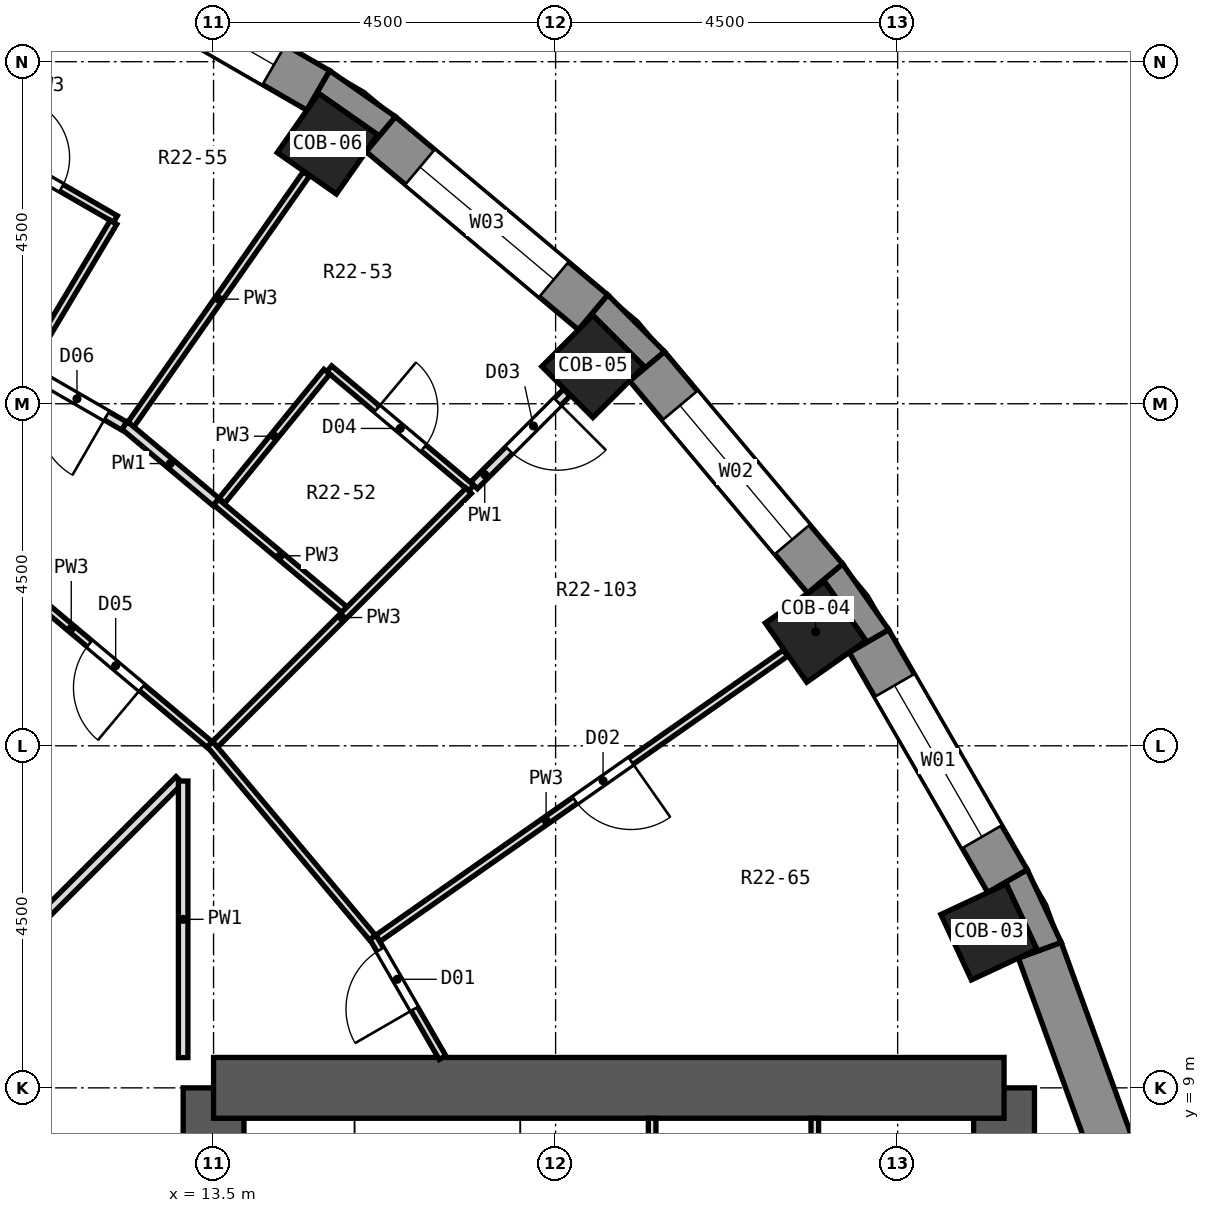
"""IFC4 building model, lengths in metres.
Left out: names, types, materials, properties, quantities, classifications, styles, units other than length and angle.
Written with IfcOpenShell. Run it as: python <this file> out.ifc"""

import sys

from ifc_helpers import new_model, si_unit, direction, frame, frame_2d, origin, origin_2d, place, context, subcontext, project, spatial, polyline, rectangle, outline, extrude, element, fill, save


model = new_model("IFC4")
c1 = context("Model", 3, precision=1e-05, world=origin(), true_north=direction((0.0, 1.0)))
c2 = subcontext(c1, "Body", "Model", "MODEL_VIEW")
j1 = project(units=[si_unit("LENGTHUNIT", "METRE"), si_unit("PLANEANGLEUNIT", "RADIAN")], contexts=[c1])
p1 = place(None, origin())
s1 = spatial("IfcSite", under=j1, at=p1, CompositionType="ELEMENT")
p2 = place(p1, origin())
s2 = spatial("IfcBuilding", under=s1, at=p2, CompositionType="ELEMENT")
p3 = place(p2, frame((0.0, 0.0, 141.4)))
s3 = spatial("IfcBuildingStorey", under=s2, at=p3, CompositionType="ELEMENT", Elevation=141.4)
for number, where, z_axis, x_axis in (
    (1, (23.7, 11.052, 0.0), (0.0, 0.0, 1.0), (0.906, 0.423, 0.0)),
    (2, (21.421, 14.999, 0.0), (0.0, 0.0, 1.0), (0.819, 0.574, 0.0)),
    (3, (18.491, 18.491, 0.0), (0.0, 0.0, 1.0), (0.707, 0.707, 0.0)),
    (4, (14.999, 21.421, 0.0), (0.0, 0.0, 1.0), (0.574, 0.819, 0.0)),
):
    element("IfcColumn", number, at=place(p3, frame(where, z_axis=z_axis, x_axis=x_axis)), inside=s3, PredefinedType="COLUMN", context=c2, shape_type="SweptSolid", body=[
        extrude(rectangle(XDim=0.95, YDim=0.95, at=origin_2d()), origin(), (0.0, 0.0, 1.0), 3.3),
    ])
p4 = place(p3, frame((13.5, -9.0, 0.0), z_axis=(0.0, 0.0, 1.0), x_axis=(0.0, 1.0, 0.0)))
e5 = element("IfcWall", 5, at=p4, inside=s3, PredefinedType="SHEAR", context=c2, shape_type="SweptSolid", body=[
    extrude(rectangle(XDim=18.0, YDim=0.8, at=frame_2d((9.0, 0.0))), origin(), (0.0, 0.0, 1.0), 3.3),
])
p5 = place(p4, frame((15.4, 0.0, 0.0)))
e6 = element("IfcOpeningElement", 6, at=p5, cuts=e5, PredefinedType="OPENING", context=c2, shape_type="SweptSolid", body=[
    extrude(rectangle(XDim=1.2, YDim=2.1, at=frame_2d((0.6, 1.05))), frame((0.0, 0.412, 0.0), z_axis=(0.0, -1.0, 0.0), x_axis=(1.0, 0.0, 0.0)), (0.0, 0.0, 1.0), 0.824),
])
p6 = place(p4, frame((1.4, 0.0, 0.0)))
e7 = element("IfcOpeningElement", 7, at=p6, cuts=e5, PredefinedType="OPENING", context=c2, shape_type="SweptSolid", body=[
    extrude(rectangle(XDim=1.2, YDim=2.1, at=frame_2d((0.6, 1.05))), frame((0.0, 0.412, 0.0), z_axis=(0.0, -1.0, 0.0), x_axis=(1.0, 0.0, 0.0)), (0.0, 0.0, 1.0), 0.824),
])
p7 = place(p4, frame((7.5, 0.0, 0.0)))
e8 = element("IfcOpeningElement", 8, at=p7, cuts=e5, PredefinedType="OPENING", context=c2, shape_type="SweptSolid", body=[
    extrude(rectangle(XDim=3.0, YDim=2.4, at=frame_2d((1.5, 1.2))), frame((0.0, 0.412, 0.0), z_axis=(0.0, -1.0, 0.0), x_axis=(1.0, 0.0, 0.0)), (0.0, 0.0, 1.0), 0.824),
])
p8 = place(p3, frame((23.9, -9.0, 0.0), z_axis=(0.0, 0.0, 1.0), x_axis=(0.0, 1.0, 0.0)))
e9 = element("IfcWall", 9, at=p8, inside=s3, PredefinedType="SHEAR", context=c2, shape_type="SweptSolid", body=[
    extrude(rectangle(XDim=18.0, YDim=0.8, at=frame_2d((9.0, 0.0))), origin(), (0.0, 0.0, 1.0), 3.3),
])
p9 = place(p3, frame((13.5, 9.0, 0.0), z_axis=(0.0, 0.0, 1.0), x_axis=(1.0, 0.0, 0.0)))
e10 = element("IfcWall", 10, at=p9, inside=s3, PredefinedType="SHEAR", context=c2, shape_type="SweptSolid", body=[
    extrude(rectangle(XDim=10.4, YDim=0.8, at=frame_2d((5.2, 0.0))), origin(), (0.0, 0.0, 1.0), 3.3),
])
p10 = place(p3, frame((25.617, 7.383, 0.0), z_axis=(0.0, 0.0, 1.0), x_axis=(-0.341990236633, 0.939703505393, 0.0)))
e11 = element("IfcWall", 11, at=p10, inside=s3, PredefinedType="SOLIDWALL", context=c2, shape_type="SweptSolid", body=[
    extrude(rectangle(XDim=3.648, YDim=0.6, at=frame_2d((1.824, 0.0))), origin(), (0.0, 0.0, 1.0), 2.8),
])
p11 = place(p3, frame((23.946, 11.719, 0.0), z_axis=(0.0, 0.0, 1.0), x_axis=(-0.499954196102, 0.866051847062, 0.0)))
e12 = element("IfcWall", 12, at=p11, inside=s3, PredefinedType="SOLIDWALL", context=c2, shape_type="SweptSolid", body=[
    extrude(rectangle(XDim=3.648, YDim=0.6, at=frame_2d((1.824, 0.0))), origin(), (0.0, 0.0, 1.0), 2.8),
])
p12 = place(p11, frame((0.674, 0.0, 0.9)))
e13 = element("IfcOpeningElement", 13, at=p12, cuts=e12, PredefinedType="OPENING", context=c2, shape_type="SweptSolid", body=[
    extrude(rectangle(XDim=2.3, YDim=1.8, at=frame_2d((1.15, 0.9))), frame((0.0, 0.312, 0.0), z_axis=(0.0, -1.0, 0.0), x_axis=(1.0, 0.0, 0.0)), (0.0, 0.0, 1.0), 0.624),
])
p13 = place(p3, frame((21.547, 15.699, 0.0), z_axis=(0.0, 0.0, 1.0), x_axis=(-0.642774476932, 0.766055462616, 0.0)))
e14 = element("IfcWall", 14, at=p13, inside=s3, PredefinedType="SOLIDWALL", context=c2, shape_type="SweptSolid", body=[
    extrude(rectangle(XDim=3.648, YDim=0.6, at=frame_2d((1.824, 0.0))), origin(), (0.0, 0.0, 1.0), 2.8),
])
p14 = place(p13, frame((0.674, 0.0, 0.9)))
e15 = element("IfcOpeningElement", 15, at=p14, cuts=e14, PredefinedType="OPENING", context=c2, shape_type="SweptSolid", body=[
    extrude(rectangle(XDim=2.3, YDim=1.8, at=frame_2d((1.15, 0.9))), frame((0.0, 0.312, 0.0), z_axis=(0.0, -1.0, 0.0), x_axis=(1.0, 0.0, 0.0)), (0.0, 0.0, 1.0), 0.624),
])
p15 = place(p3, frame((18.494, 19.202, 0.0), z_axis=(0.0, 0.0, 1.0), x_axis=(-0.766055462616, 0.642774476932, 0.0)))
e16 = element("IfcWall", 16, at=p15, inside=s3, PredefinedType="SOLIDWALL", context=c2, shape_type="SweptSolid", body=[
    extrude(rectangle(XDim=3.648, YDim=0.6, at=frame_2d((1.824, 0.0))), origin(), (0.0, 0.0, 1.0), 2.8),
])
p16 = place(p15, frame((0.674, 0.0, 0.9)))
e17 = element("IfcOpeningElement", 17, at=p16, cuts=e16, PredefinedType="OPENING", context=c2, shape_type="SweptSolid", body=[
    extrude(rectangle(XDim=2.3, YDim=1.8, at=frame_2d((1.15, 0.9))), frame((0.0, 0.312, 0.0), z_axis=(0.0, -1.0, 0.0), x_axis=(1.0, 0.0, 0.0)), (0.0, 0.0, 1.0), 0.624),
])
p17 = place(p3, frame((14.878, 22.122, 0.0), z_axis=(0.0, 0.0, 1.0), x_axis=(-0.866051847062, 0.499954196102, 0.0)))
e18 = element("IfcWall", 18, at=p17, inside=s3, PredefinedType="SOLIDWALL", context=c2, shape_type="SweptSolid", body=[
    extrude(rectangle(XDim=3.648, YDim=0.6, at=frame_2d((1.824, 0.0))), origin(), (0.0, 0.0, 1.0), 2.8),
])
p18 = place(p17, frame((0.674, 0.0, 0.9)))
e19 = element("IfcOpeningElement", 19, at=p18, cuts=e18, PredefinedType="OPENING", context=c2, shape_type="SweptSolid", body=[
    extrude(rectangle(XDim=2.3, YDim=1.8, at=frame_2d((1.15, 0.9))), frame((0.0, 0.312, 0.0), z_axis=(0.0, -1.0, 0.0), x_axis=(1.0, 0.0, 0.0)), (0.0, 0.0, 1.0), 0.624),
])
p19 = place(p3, origin())
e20 = element("IfcWall", 20, at=p19, inside=s3, PredefinedType="SOLIDWALL", context=c2, shape_type="SweptSolid", body=[
    extrude(outline(polyline([(24.651, 10.913), (24.206, 11.869), (23.686, 11.569), (23.93, 11.683), (24.331, 10.822), (24.087, 10.708), (24.651, 10.913)])), origin(), (0.0, 0.0, 1.0), 2.8),
])
p20 = place(p3, origin())
e21 = element("IfcWall", 21, at=p20, inside=s3, PredefinedType="SOLIDWALL", context=c2, shape_type="SweptSolid", body=[
    extrude(outline(polyline([(21.777, 15.892), (21.317, 15.506), (21.538, 15.661), (22.083, 14.882), (21.862, 14.728), (22.382, 15.028), (21.777, 15.892)])), origin(), (0.0, 0.0, 1.0), 2.8),
])
p21 = place(p3, origin())
e22 = element("IfcWall", 22, at=p21, inside=s3, PredefinedType="SOLIDWALL", context=c2, shape_type="SweptSolid", body=[
    extrude(outline(polyline([(19.432, 18.686), (18.686, 19.432), (18.301, 18.972), (18.491, 19.163), (19.163, 18.491), (18.972, 18.301), (19.432, 18.686)])), origin(), (0.0, 0.0, 1.0), 2.8),
])
p22 = place(p3, origin())
e23 = element("IfcWall", 23, at=p22, inside=s3, PredefinedType="SOLIDWALL", context=c2, shape_type="SweptSolid", body=[
    extrude(outline(polyline([(15.028, 22.382), (14.728, 21.862), (14.882, 22.083), (15.661, 21.538), (15.506, 21.317), (15.892, 21.777), (15.028, 22.382)])), origin(), (0.0, 0.0, 1.0), 2.8),
])
p23 = place(p3, frame((15.597, 10.983, 0.0), z_axis=(0.0, 0.0, 1.0), x_axis=(0.500084239528, -0.865976762607, 0.0)))
e24 = element("IfcWall", 24, at=p23, inside=s3, PredefinedType="PARTITIONING", context=c2, shape_type="SweptSolid", body=[
    extrude(rectangle(XDim=1.83, YDim=0.1, at=frame_2d((0.915, 0.0))), origin(), (0.0, 0.0, 1.0), 2.8),
])
p24 = place(p23, frame((0.19, 0.0, 0.0)))
e25 = element("IfcOpeningElement", 25, at=p24, cuts=e24, PredefinedType="OPENING", context=c2, shape_type="SweptSolid", body=[
    extrude(rectangle(XDim=0.9, YDim=2.1, at=frame_2d((0.45, 1.05))), frame((0.0, 0.062, 0.0), z_axis=(0.0, -1.0, 0.0), x_axis=(1.0, 0.0, 0.0)), (0.0, 0.0, 1.0), 0.124),
])
p25 = place(p3, frame((13.452, 13.524, 0.0), z_axis=(0.0, 0.0, 1.0), x_axis=(0.642888943472, -0.765959402554, 0.0)))
e26 = element("IfcWall", 26, at=p25, inside=s3, PredefinedType="PARTITIONING", context=c2, shape_type="SweptSolid", body=[
    extrude(rectangle(XDim=3.325, YDim=0.1, at=frame_2d((1.662, 0.0))), origin(), (0.0, 0.0, 1.0), 2.8),
])
p26 = place(p3, frame((10.9, 15.655, 0.0), z_axis=(0.0, 0.0, 1.0), x_axis=(0.765959402554, -0.642888943472, 0.0)))
e27 = element("IfcWall", 27, at=p26, inside=s3, PredefinedType="PARTITIONING", context=c2, shape_type="SweptSolid", body=[
    extrude(rectangle(XDim=3.325, YDim=0.1, at=frame_2d((1.662, 0.0))), origin(), (0.0, 0.0, 1.0), 2.8),
])
p27 = place(p26, frame((1.263, 0.0, 0.0)))
e28 = element("IfcOpeningElement", 28, at=p27, cuts=e27, PredefinedType="OPENING", context=c2, shape_type="SweptSolid", body=[
    extrude(rectangle(XDim=0.9, YDim=2.1, at=frame_2d((0.45, 1.05))), frame((0.0, 0.062, 0.0), z_axis=(0.0, -1.0, 0.0), x_axis=(1.0, 0.0, 0.0)), (0.0, 0.0, 1.0), 0.124),
])
p28 = place(p3, frame((13.532, 16.708, 0.0), z_axis=(0.0, 0.0, 1.0), x_axis=(0.766038513467, -0.642794676305, 0.0)))
e29 = element("IfcWall", 29, at=p28, inside=s3, PredefinedType="PARTITIONING", context=c2, shape_type="SweptSolid", body=[
    extrude(rectangle(XDim=2.205, YDim=0.1, at=frame_2d((1.103, 0.0))), origin(), (0.0, 0.0, 1.0), 2.8),
])
p29 = place(p3, frame((12.328, 17.718, 0.0), z_axis=(0.0, 0.0, 1.0), x_axis=(0.76611500949, -0.642703502585, 0.0)))
e30 = element("IfcWall", 30, at=p29, inside=s3, PredefinedType="PARTITIONING", context=c2, shape_type="SweptSolid", body=[
    extrude(rectangle(XDim=1.571, YDim=0.125, at=frame_2d((0.785, 0.0))), origin(), (0.0, 0.0, 1.0), 2.8),
])
p30 = place(p3, frame((15.022, 18.46, 0.0), z_axis=(0.0, 0.0, 1.0), x_axis=(0.765953139847, -0.642896404997, 0.0)))
e31 = element("IfcWall", 31, at=p30, inside=s3, PredefinedType="PARTITIONING", context=c2, shape_type="SweptSolid", body=[
    extrude(rectangle(XDim=2.44, YDim=0.1, at=frame_2d((1.22, 0.0))), origin(), (0.0, 0.0, 1.0), 2.8),
])
p31 = place(p30, frame((0.82, 0.0, 0.0)))
e32 = element("IfcOpeningElement", 32, at=p31, cuts=e31, PredefinedType="OPENING", context=c2, shape_type="SweptSolid", body=[
    extrude(rectangle(XDim=0.8, YDim=2.1, at=frame_2d((0.4, 1.05))), frame((0.0, 0.062, 0.0), z_axis=(0.0, -1.0, 0.0), x_axis=(1.0, 0.0, 0.0)), (0.0, 0.0, 1.0), 0.124),
])
p32 = place(p3, frame((11.072, 18.43, 0.0), z_axis=(0.0, 0.0, 1.0), x_axis=(0.866112382925, -0.499849317439, 0.0)))
e33 = element("IfcWall", 33, at=p32, inside=s3, PredefinedType="PARTITIONING", context=c2, shape_type="SweptSolid", body=[
    extrude(rectangle(XDim=1.444, YDim=0.125, at=frame_2d((0.722, 0.0))), origin(), (0.0, 0.0, 1.0), 2.8),
])
p33 = place(p32, frame((0.278, 0.0, 0.0)))
e34 = element("IfcOpeningElement", 34, at=p33, cuts=e33, PredefinedType="OPENING", context=c2, shape_type="SweptSolid", body=[
    extrude(rectangle(XDim=0.9, YDim=2.1, at=frame_2d((0.45, 1.05))), frame((0.0, 0.074, 0.0), z_axis=(0.0, -1.0, 0.0), x_axis=(1.0, 0.0, 0.0)), (0.0, 0.0, 1.0), 0.149),
])
p34 = place(p3, frame((10.139, 21.625, 0.0), z_axis=(0.0, 0.0, 1.0), x_axis=(0.865989934965, -0.500061428766, 0.0)))
e35 = element("IfcWall", 35, at=p34, inside=s3, PredefinedType="PARTITIONING", context=c2, shape_type="SweptSolid", body=[
    extrude(rectangle(XDim=2.39, YDim=0.1, at=frame_2d((1.195, 0.0))), origin(), (0.0, 0.0, 1.0), 2.8),
])
p35 = place(p34, frame((0.77, 0.0, 0.0)))
e36 = element("IfcOpeningElement", 36, at=p35, cuts=e35, PredefinedType="OPENING", context=c2, shape_type="SweptSolid", body=[
    extrude(rectangle(XDim=0.8, YDim=2.1, at=frame_2d((0.4, 1.05))), frame((0.0, 0.062, 0.0), z_axis=(0.0, -1.0, 0.0), x_axis=(1.0, 0.0, 0.0)), (0.0, 0.0, 1.0), 0.124),
])
p36 = place(p3, frame((15.663, 10.968, 0.0), z_axis=(0.0, 0.0, 1.0), x_axis=(0.8192371786, 0.573454832746, 0.0)))
e37 = element("IfcWall", 37, at=p36, inside=s3, PredefinedType="PARTITIONING", context=c2, shape_type="SweptSolid", body=[
    extrude(rectangle(XDim=6.544, YDim=0.1, at=frame_2d((3.272, 0.0))), origin(), (0.0, 0.0, 1.0), 2.8),
])
p37 = place(p36, frame((3.165, 0.0, 0.0)))
e38 = element("IfcOpeningElement", 38, at=p37, cuts=e37, PredefinedType="OPENING", context=c2, shape_type="SweptSolid", body=[
    extrude(rectangle(XDim=0.9, YDim=2.1, at=frame_2d((0.45, 1.05))), frame((0.0, 0.062, 0.0), z_axis=(0.0, -1.0, 0.0), x_axis=(1.0, 0.0, 0.0)), (0.0, 0.0, 1.0), 0.124),
])
p38 = place(p3, frame((13.52, 13.52, 0.0), z_axis=(0.0, 0.0, 1.0), x_axis=(0.707106781187, 0.707106781187, 0.0)))
e39 = element("IfcWall", 39, at=p38, inside=s3, PredefinedType="PARTITIONING", context=c2, shape_type="SweptSolid", body=[
    extrude(rectangle(XDim=4.717, YDim=0.1, at=frame_2d((2.358, 0.0))), origin(), (0.0, 0.0, 1.0), 2.8),
])
p39 = place(p3, frame((8.278, 8.278, 0.0), z_axis=(0.0, 0.0, 1.0), x_axis=(0.707106781187, 0.707106781187, 0.0)))
e40 = element("IfcWall", 40, at=p39, inside=s3, PredefinedType="PARTITIONING", context=c2, shape_type="SweptSolid", body=[
    extrude(rectangle(XDim=6.75, YDim=0.125, at=frame_2d((3.375, 0.0))), origin(), (0.0, 0.0, 1.0), 2.8),
])
p40 = place(p3, frame((16.926, 16.926, 0.0), z_axis=(0.0, 0.0, 1.0), x_axis=(0.707106781187, 0.707106781187, 0.0)))
e41 = element("IfcWall", 41, at=p40, inside=s3, PredefinedType="PARTITIONING", context=c2, shape_type="SweptSolid", body=[
    extrude(rectangle(XDim=1.728, YDim=0.125, at=frame_2d((0.864, 0.0))), origin(), (0.0, 0.0, 1.0), 2.8),
])
p41 = place(p40, frame((0.655, 0.0, 0.0)))
e42 = element("IfcOpeningElement", 42, at=p41, cuts=e41, PredefinedType="OPENING", context=c2, shape_type="SweptSolid", body=[
    extrude(rectangle(XDim=0.9, YDim=2.1, at=frame_2d((0.45, 1.05))), frame((0.0, 0.074, 0.0), z_axis=(0.0, -1.0, 0.0), x_axis=(1.0, 0.0, 0.0)), (0.0, 0.0, 1.0), 0.149),
])
p42 = place(p3, frame((13.609, 16.724, 0.0), z_axis=(0.0, 0.0, 1.0), x_axis=(0.631272959342, 0.77556073315, 0.0)))
e43 = element("IfcWall", 43, at=p42, inside=s3, PredefinedType="PARTITIONING", context=c2, shape_type="SweptSolid", body=[
    extrude(rectangle(XDim=2.188, YDim=0.1, at=frame_2d((1.094, 0.0))), origin(), (0.0, 0.0, 1.0), 2.8),
])
p43 = place(p3, frame((12.413, 17.728, 0.0), z_axis=(0.0, 0.0, 1.0), x_axis=(0.573641530368, 0.819106461113, 0.0)))
e44 = element("IfcWall", 44, at=p43, inside=s3, PredefinedType="PARTITIONING", context=c2, shape_type="SweptSolid", body=[
    extrude(rectangle(XDim=4.023, YDim=0.1, at=frame_2d((2.012, 0.0))), origin(), (0.0, 0.0, 1.0), 2.8),
])
p44 = place(p3, frame((11.061, 18.509, 0.0), z_axis=(0.0, 0.0, 1.0), x_axis=(0.512903306279, 0.85844638645, 0.0)))
e45 = element("IfcWall", 45, at=p44, inside=s3, PredefinedType="PARTITIONING", context=c2, shape_type="SweptSolid", body=[
    extrude(rectangle(XDim=2.188, YDim=0.1, at=frame_2d((1.094, 0.0))), origin(), (0.0, 0.0, 1.0), 2.8),
])
p45 = place(p3, frame((13.1, 9.398, 0.0), z_axis=(0.0, 0.0, 1.0), x_axis=(0.0, 1.0, 0.0)))
e46 = element("IfcWall", 46, at=p45, inside=s3, PredefinedType="PARTITIONING", context=c2, shape_type="SweptSolid", body=[
    extrude(rectangle(XDim=3.639, YDim=0.125, at=frame_2d((1.819, 0.0))), origin(), (0.0, 0.0, 1.0), 2.8),
])
p46 = place(p3, frame((19.27, 5.25, 0.0), z_axis=(0.0, 0.0, 1.0), x_axis=(0.0, 1.0, 0.0)))
e47 = element("IfcWall", 47, at=p46, inside=s3, PredefinedType="PARTITIONING", context=c2, shape_type="SweptSolid", body=[
    extrude(rectangle(XDim=3.35, YDim=0.1, at=frame_2d((1.675, 0.0))), origin(), (0.0, 0.0, 1.0), 2.8),
])
p47 = place(p3, frame((21.41, 5.25, 0.0), z_axis=(0.0, 0.0, 1.0), x_axis=(0.0, 1.0, 0.0)))
e48 = element("IfcWall", 48, at=p47, inside=s3, PredefinedType="PARTITIONING", context=c2, shape_type="SweptSolid", body=[
    extrude(rectangle(XDim=3.35, YDim=0.1, at=frame_2d((1.675, 0.0))), origin(), (0.0, 0.0, 1.0), 2.8),
])
p48 = place(p47, frame((1.225, 0.0, 0.0)))
e49 = element("IfcOpeningElement", 49, at=p48, cuts=e48, PredefinedType="OPENING", context=c2, shape_type="SweptSolid", body=[
    extrude(rectangle(XDim=0.9, YDim=2.1, at=frame_2d((0.45, 1.05))), frame((0.0, 0.062, 0.0), z_axis=(0.0, -1.0, 0.0), x_axis=(1.0, 0.0, 0.0)), (0.0, 0.0, 1.0), 0.124),
])
p49 = place(p12, origin())
e50 = element("IfcWindow", 50, at=p49, inside=s3, PartitioningType="SINGLE_PANEL", PredefinedType="WINDOW", context=c2, shape_type="SweptSolid", body=[
    extrude(rectangle(XDim=2.3, YDim=1.8, at=frame_2d((1.15, 0.9))), frame((0.0, 0.18, 0.0), z_axis=(0.0, -1.0, 0.0), x_axis=(1.0, 0.0, 0.0)), (0.0, 0.0, 1.0), 0.06),
])
fill(e13, e50)
p50 = place(p14, origin())
e51 = element("IfcWindow", 51, at=p50, inside=s3, PartitioningType="SINGLE_PANEL", PredefinedType="WINDOW", context=c2, shape_type="SweptSolid", body=[
    extrude(rectangle(XDim=2.3, YDim=1.8, at=frame_2d((1.15, 0.9))), frame((0.0, 0.18, 0.0), z_axis=(0.0, -1.0, 0.0), x_axis=(1.0, 0.0, 0.0)), (0.0, 0.0, 1.0), 0.06),
])
fill(e15, e51)
p51 = place(p16, origin())
e52 = element("IfcWindow", 52, at=p51, inside=s3, PartitioningType="SINGLE_PANEL", PredefinedType="WINDOW", context=c2, shape_type="SweptSolid", body=[
    extrude(rectangle(XDim=2.3, YDim=1.8, at=frame_2d((1.15, 0.9))), frame((0.0, 0.18, 0.0), z_axis=(0.0, -1.0, 0.0), x_axis=(1.0, 0.0, 0.0)), (0.0, 0.0, 1.0), 0.06),
])
fill(e17, e52)
p52 = place(p18, origin())
e53 = element("IfcWindow", 53, at=p52, inside=s3, PartitioningType="SINGLE_PANEL", PredefinedType="WINDOW", context=c2, shape_type="SweptSolid", body=[
    extrude(rectangle(XDim=2.3, YDim=1.8, at=frame_2d((1.15, 0.9))), frame((0.0, 0.18, 0.0), z_axis=(0.0, -1.0, 0.0), x_axis=(1.0, 0.0, 0.0)), (0.0, 0.0, 1.0), 0.06),
])
fill(e19, e53)
p53 = place(p24, frame((0.9, 0.0, 0.0), z_axis=(0.0, 0.0, 1.0), x_axis=(-1.0, 0.0, 0.0)))
e54 = element("IfcDoor", 54, at=p53, inside=s3, OperationType="SINGLE_SWING_LEFT", PredefinedType="DOOR", context=c2, shape_type="SweptSolid", body=[
    extrude(rectangle(XDim=0.9, YDim=2.1, at=frame_2d((0.45, 1.05))), frame((0.0, 0.025, 0.0), z_axis=(0.0, -1.0, 0.0), x_axis=(1.0, 0.0, 0.0)), (0.0, 0.0, 1.0), 0.05),
])
fill(e25, e54)
p54 = place(p37, frame((0.9, 0.0, 0.0), z_axis=(0.0, 0.0, 1.0), x_axis=(-1.0, 0.0, 0.0)))
e55 = element("IfcDoor", 55, at=p54, inside=s3, OperationType="SINGLE_SWING_LEFT", PredefinedType="DOOR", context=c2, shape_type="SweptSolid", body=[
    extrude(rectangle(XDim=0.9, YDim=2.1, at=frame_2d((0.45, 1.05))), frame((0.0, 0.025, 0.0), z_axis=(0.0, -1.0, 0.0), x_axis=(1.0, 0.0, 0.0)), (0.0, 0.0, 1.0), 0.05),
])
fill(e38, e55)
p55 = place(p41, frame((0.9, 0.0, 0.0), z_axis=(0.0, 0.0, 1.0), x_axis=(-1.0, 0.0, 0.0)))
e56 = element("IfcDoor", 56, at=p55, inside=s3, OperationType="SINGLE_SWING_LEFT", PredefinedType="DOOR", context=c2, shape_type="SweptSolid", body=[
    extrude(rectangle(XDim=0.9, YDim=2.1, at=frame_2d((0.45, 1.05))), frame((0.0, 0.025, 0.0), z_axis=(0.0, -1.0, 0.0), x_axis=(1.0, 0.0, 0.0)), (0.0, 0.0, 1.0), 0.05),
])
fill(e42, e56)
p56 = place(p31, origin())
e57 = element("IfcDoor", 57, at=p56, inside=s3, OperationType="SINGLE_SWING_LEFT", PredefinedType="DOOR", context=c2, shape_type="SweptSolid", body=[
    extrude(rectangle(XDim=0.8, YDim=2.1, at=frame_2d((0.4, 1.05))), frame((0.0, 0.025, 0.0), z_axis=(0.0, -1.0, 0.0), x_axis=(1.0, 0.0, 0.0)), (0.0, 0.0, 1.0), 0.05),
])
fill(e32, e57)
p57 = place(p27, frame((0.9, 0.0, 0.0), z_axis=(0.0, 0.0, 1.0), x_axis=(-1.0, 0.0, 0.0)))
e58 = element("IfcDoor", 58, at=p57, inside=s3, OperationType="SINGLE_SWING_LEFT", PredefinedType="DOOR", context=c2, shape_type="SweptSolid", body=[
    extrude(rectangle(XDim=0.9, YDim=2.1, at=frame_2d((0.45, 1.05))), frame((0.0, 0.025, 0.0), z_axis=(0.0, -1.0, 0.0), x_axis=(1.0, 0.0, 0.0)), (0.0, 0.0, 1.0), 0.05),
])
fill(e28, e58)
p58 = place(p33, frame((0.9, 0.0, 0.0), z_axis=(0.0, 0.0, 1.0), x_axis=(-1.0, 0.0, 0.0)))
e59 = element("IfcDoor", 59, at=p58, inside=s3, OperationType="SINGLE_SWING_LEFT", PredefinedType="DOOR", context=c2, shape_type="SweptSolid", body=[
    extrude(rectangle(XDim=0.9, YDim=2.1, at=frame_2d((0.45, 1.05))), frame((0.0, 0.025, 0.0), z_axis=(0.0, -1.0, 0.0), x_axis=(1.0, 0.0, 0.0)), (0.0, 0.0, 1.0), 0.05),
])
fill(e34, e59)
p59 = place(p35, origin())
e60 = element("IfcDoor", 60, at=p59, inside=s3, OperationType="SINGLE_SWING_LEFT", PredefinedType="DOOR", context=c2, shape_type="SweptSolid", body=[
    extrude(rectangle(XDim=0.8, YDim=2.1, at=frame_2d((0.4, 1.05))), frame((0.0, 0.025, 0.0), z_axis=(0.0, -1.0, 0.0), x_axis=(1.0, 0.0, 0.0)), (0.0, 0.0, 1.0), 0.05),
])
fill(e36, e60)
save(model, sys.argv[1])
